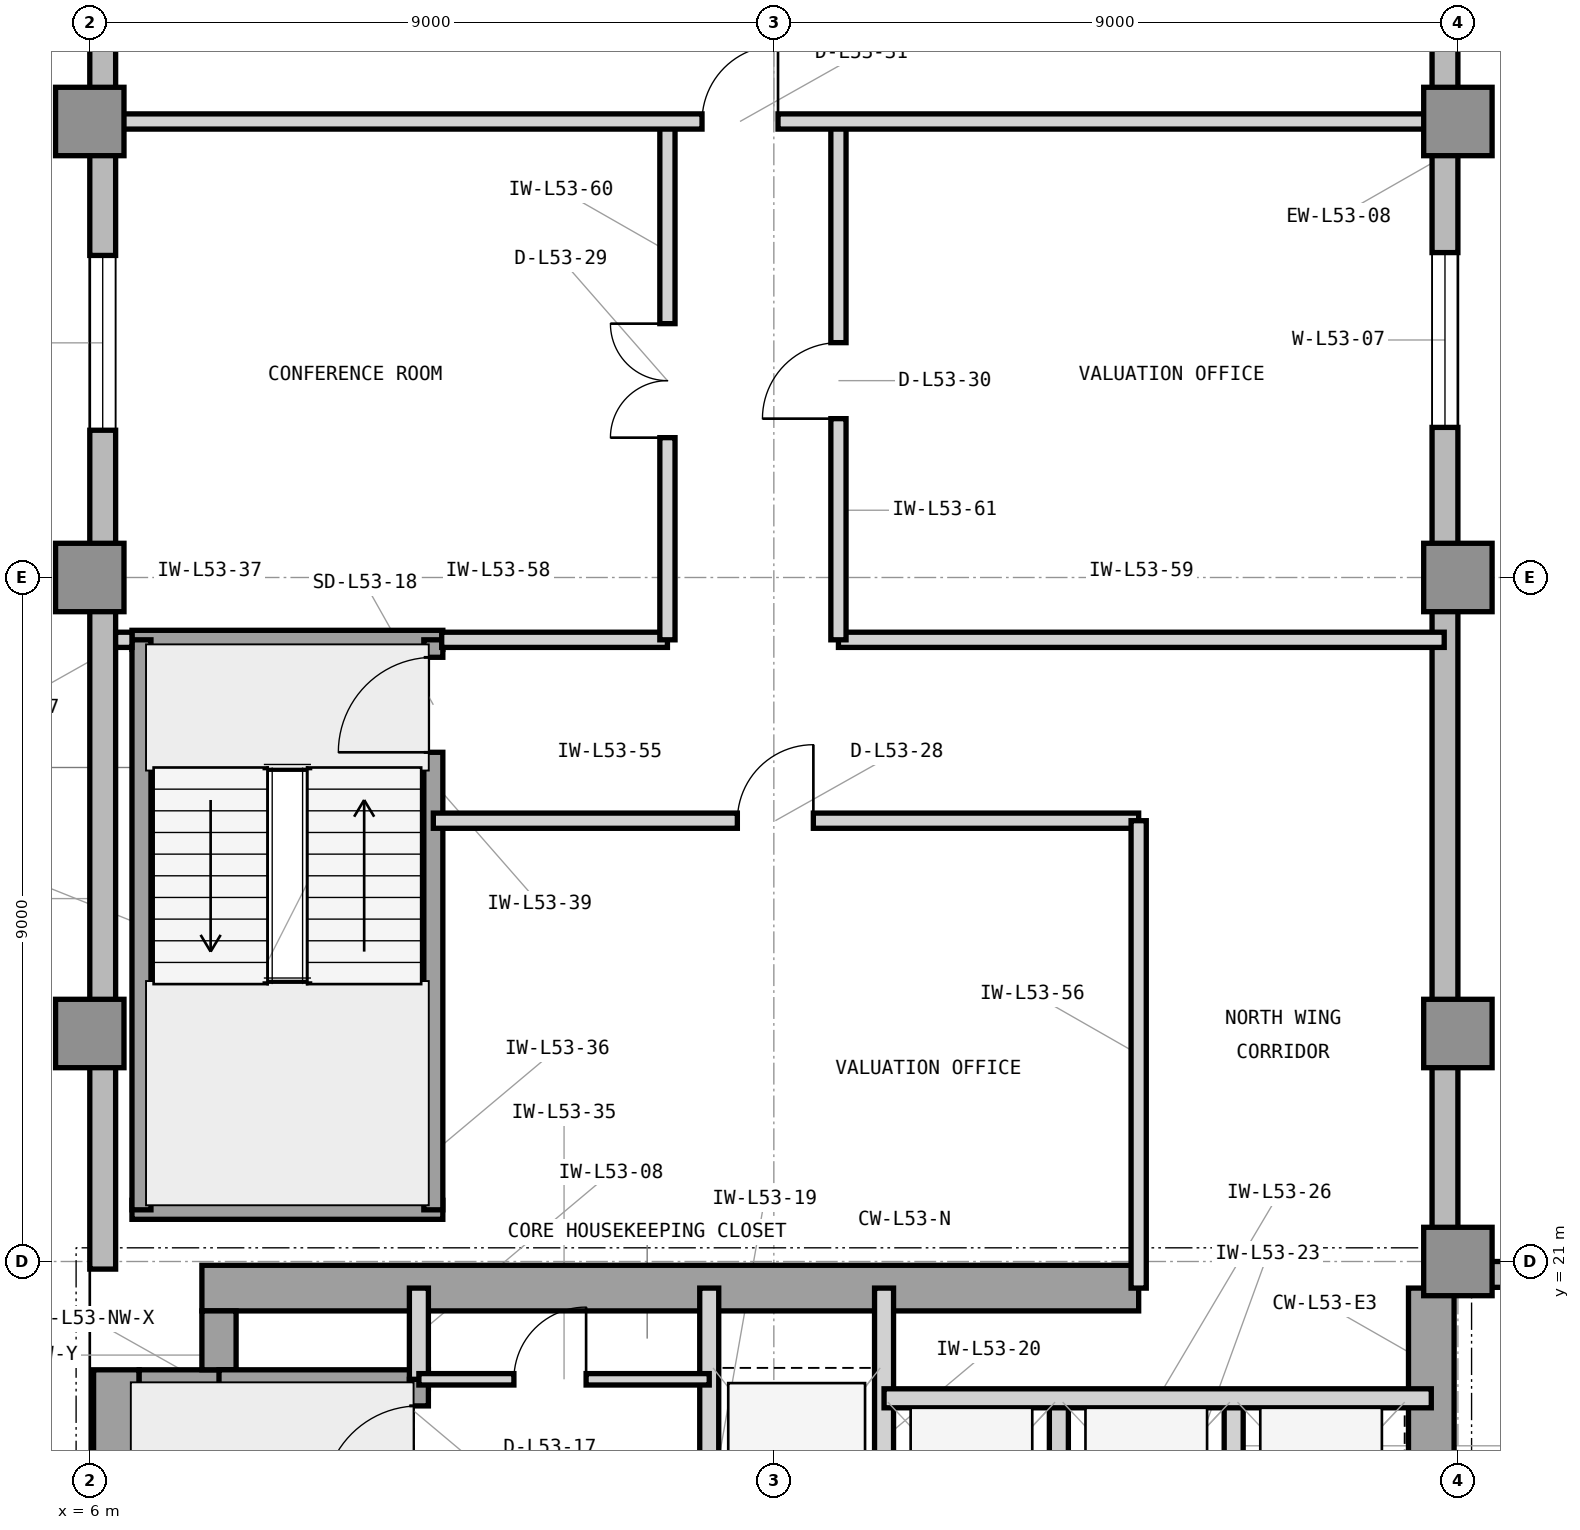
"""IFC4 building model, lengths in metres.
Left out: names, types, materials, properties, quantities, classifications, styles, units other than length and angle.
Written with IfcOpenShell. Run it as: python <this file> out.ifc"""

import sys

from ifc_helpers import new_model, si_unit, direction, frame, frame_2d, origin, origin_2d, place, context, subcontext, project, spatial, rectangle, extrude, element, fill, save


model = new_model("IFC4")
c1 = context("Model", 3, precision=1e-05, world=origin(), true_north=direction((0.0, 1.0)))
c2 = subcontext(c1, "Body", "Model", "MODEL_VIEW")
j1 = project(units=[si_unit("LENGTHUNIT", "METRE"), si_unit("PLANEANGLEUNIT", "RADIAN")], contexts=[c1])
p1 = place(None, origin())
s1 = spatial("IfcSite", under=j1, at=p1, CompositionType="ELEMENT")
p2 = place(p1, origin())
s2 = spatial("IfcBuilding", under=s1, at=p2, CompositionType="ELEMENT")
p3 = place(p2, frame((0.0, 0.0, 219.0)))
s3 = spatial("IfcBuildingStorey", under=s2, at=p3, CompositionType="ELEMENT", Elevation=219.0)
p4 = place(p3, frame((6.35, 4.425, 0.0), z_axis=(0.0, 0.0, 1.0), x_axis=(0.0, 1.0, 0.0)))
e1 = element("IfcWall", 1, at=p4, inside=s3, PredefinedType="SHEAR", context=c2, shape_type="SweptSolid", body=[
    extrude(rectangle(XDim=15.15, YDim=0.6, at=frame_2d((7.575, 0.0))), origin(), (0.0, 0.0, 1.0), 3.9),
])
p5 = place(p3, frame((7.475, 20.65, 0.0), z_axis=(0.0, 0.0, 1.0), x_axis=(1.0, 0.0, 0.0)))
e2 = element("IfcWall", 2, at=p5, inside=s3, PredefinedType="SHEAR", context=c2, shape_type="SweptSolid", body=[
    extrude(rectangle(XDim=12.325, YDim=0.6, at=frame_2d((6.163, 0.0))), origin(), (0.0, 0.0, 1.0), 3.9),
])
p6 = place(p3, frame((23.65, 16.6, 0.0), z_axis=(0.0, 0.0, 1.0), x_axis=(0.0, 1.0, 0.0)))
e3 = element("IfcWall", 3, at=p6, inside=s3, PredefinedType="SHEAR", context=c2, shape_type="SweptSolid", body=[
    extrude(rectangle(XDim=4.05, YDim=0.6, at=frame_2d((2.025, 0.0))), origin(), (0.0, 0.0, 1.0), 3.9),
])
p7 = place(p3, frame((6.65, 19.35, 0.0), z_axis=(0.0, 0.0, 1.0), x_axis=(1.0, 0.0, 0.0)))
e4 = element("IfcWall", 4, at=p7, inside=s3, PredefinedType="SHEAR", context=c2, shape_type="SweptSolid", body=[
    extrude(rectangle(XDim=1.275, YDim=0.45, at=frame_2d((0.638, 0.0))), origin(), (0.0, 0.0, 1.0), 3.9),
])
p8 = place(p3, frame((7.7, 19.575, 0.0), z_axis=(0.0, 0.0, 1.0), x_axis=(0.0, 1.0, 0.0)))
e5 = element("IfcWall", 5, at=p8, inside=s3, PredefinedType="SHEAR", context=c2, shape_type="SweptSolid", body=[
    extrude(rectangle(XDim=0.775, YDim=0.45, at=frame_2d((0.388, 0.0))), origin(), (0.0, 0.0, 1.0), 3.9),
])
for number, where, z_axis, x_axis in (
    (6, (24.0, 21.0, 0.0), (0.0, 0.0, 1.0), (1.0, 0.0, 0.0)),
    (7, (6.0, 24.0, 0.0), (0.0, 0.0, 1.0), (1.0, 0.0, 0.0)),
    (8, (24.0, 24.0, 0.0), (0.0, 0.0, 1.0), (1.0, 0.0, 0.0)),
    (9, (6.0, 30.0, 0.0), (0.0, 0.0, 1.0), (1.0, 0.0, 0.0)),
    (10, (24.0, 30.0, 0.0), (0.0, 0.0, 1.0), (1.0, 0.0, 0.0)),
    (11, (6.0, 36.0, 0.0), (0.0, 0.0, 1.0), (1.0, 0.0, 0.0)),
    (12, (24.0, 36.0, 0.0), (0.0, 0.0, 1.0), (1.0, 0.0, 0.0)),
):
    element("IfcColumn", number, at=place(p3, frame(where, z_axis=z_axis, x_axis=x_axis)), inside=s3, PredefinedType="COLUMN", context=c2, shape_type="SweptSolid", body=[
        extrude(rectangle(XDim=0.9, YDim=0.9, at=origin_2d()), origin(), (0.0, 0.0, 1.0), 3.9),
    ])
p9 = place(p3, frame((55.4, 20.83, 0.0), z_axis=(0.0, 0.0, 1.0), x_axis=(-1.0, 0.0, 0.0)))
e13 = element("IfcWall", 13, at=p9, inside=s3, PredefinedType="STANDARD", context=c2, shape_type="SweptSolid", body=[
    extrude(rectangle(XDim=31.4, YDim=0.34, at=frame_2d((15.7, 0.0))), origin(), (0.0, 0.0, 1.0), 3.65),
])
p10 = place(p9, frame((17.167, 0.0, 0.9)))
e14 = element("IfcOpeningElement", 14, at=p10, cuts=e13, PredefinedType="OPENING", context=c2, shape_type="SweptSolid", body=[
    extrude(rectangle(XDim=2.3, YDim=2.2, at=frame_2d((1.15, 1.1))), frame((0.0, 0.18, 0.0), z_axis=(0.0, -1.0, 0.0), x_axis=(1.0, 0.0, 0.0)), (0.0, 0.0, 1.0), 0.36),
])
p11 = place(p9, frame((29.046, 0.0, 0.9)))
e15 = element("IfcOpeningElement", 15, at=p11, cuts=e13, PredefinedType="OPENING", context=c2, shape_type="SweptSolid", body=[
    extrude(rectangle(XDim=1.6, YDim=2.2, at=frame_2d((0.8, 1.1))), frame((0.0, 0.18, 0.0), z_axis=(0.0, -1.0, 0.0), x_axis=(1.0, 0.0, 0.0)), (0.0, 0.0, 1.0), 0.36),
])
p12 = place(p9, frame((8.925, 0.0, 0.9)))
e16 = element("IfcOpeningElement", 16, at=p12, cuts=e13, PredefinedType="OPENING", context=c2, shape_type="SweptSolid", body=[
    extrude(rectangle(XDim=2.3, YDim=2.2, at=frame_2d((1.15, 1.1))), frame((0.0, 0.18, 0.0), z_axis=(0.0, -1.0, 0.0), x_axis=(1.0, 0.0, 0.0)), (0.0, 0.0, 1.0), 0.36),
])
p13 = place(p3, frame((23.83, 21.0, 0.0), z_axis=(0.0, 0.0, 1.0), x_axis=(0.0, 1.0, 0.0)))
e17 = element("IfcWall", 17, at=p13, inside=s3, PredefinedType="STANDARD", context=c2, shape_type="SweptSolid", body=[
    extrude(rectangle(XDim=19.4, YDim=0.34, at=frame_2d((9.7, 0.0))), origin(), (0.0, 0.0, 1.0), 3.65),
])
p14 = place(p13, frame((10.975, 0.0, 0.9)))
e18 = element("IfcOpeningElement", 18, at=p14, cuts=e17, PredefinedType="OPENING", context=c2, shape_type="SweptSolid", body=[
    extrude(rectangle(XDim=2.3, YDim=2.2, at=frame_2d((1.15, 1.1))), frame((0.0, 0.18, 0.0), z_axis=(0.0, -1.0, 0.0), x_axis=(1.0, 0.0, 0.0)), (0.0, 0.0, 1.0), 0.36),
])
p15 = place(p3, frame((6.17, 40.4, 0.0), z_axis=(0.0, 0.0, 1.0), x_axis=(0.0, -1.0, 0.0)))
e19 = element("IfcWall", 19, at=p15, inside=s3, PredefinedType="STANDARD", context=c2, shape_type="SweptSolid", body=[
    extrude(rectangle(XDim=19.5, YDim=0.34, at=frame_2d((9.75, 0.0))), origin(), (0.0, 0.0, 1.0), 3.65),
])
p16 = place(p15, frame((6.163, 0.0, 0.9)))
e20 = element("IfcOpeningElement", 20, at=p16, cuts=e19, PredefinedType="OPENING", context=c2, shape_type="SweptSolid", body=[
    extrude(rectangle(XDim=2.3, YDim=2.2, at=frame_2d((1.15, 1.1))), frame((0.0, 0.18, 0.0), z_axis=(0.0, -1.0, 0.0), x_axis=(1.0, 0.0, 0.0)), (0.0, 0.0, 1.0), 0.36),
])
p17 = place(p3, frame((7.7, 19.45, 0.0), z_axis=(0.0, 0.0, 1.0), x_axis=(1.0, 0.0, 0.0)))
e21 = element("IfcWall", 21, at=p17, inside=s3, PredefinedType="SHEAR", context=c2, shape_type="SweptSolid", body=[
    extrude(rectangle(XDim=2.755, YDim=0.25, at=frame_2d((1.377, 0.0))), origin(), (0.0, 0.0, 1.0), 3.9),
])
p18 = place(p3, frame((10.33, 12.0, 0.0), z_axis=(0.0, 0.0, 1.0), x_axis=(0.0, 1.0, 0.0)))
e22 = element("IfcWall", 22, at=p18, inside=s3, PredefinedType="SHEAR", context=c2, shape_type="SweptSolid", body=[
    extrude(rectangle(XDim=7.45, YDim=0.25, at=frame_2d((3.725, 0.0))), origin(), (0.0, 0.0, 1.0), 3.9),
])
p19 = place(p18, frame((5.85, 0.0, 0.0)))
e23 = element("IfcOpeningElement", 23, at=p19, cuts=e22, PredefinedType="OPENING", context=c2, shape_type="SweptSolid", body=[
    extrude(rectangle(XDim=1.25, YDim=2.2, at=frame_2d((0.625, 1.1))), frame((0.0, 0.135, 0.0), z_axis=(0.0, -1.0, 0.0), x_axis=(1.0, 0.0, 0.0)), (0.0, 0.0, 1.0), 0.27),
])
p20 = place(p3, frame((10.33, 19.45, 0.0), z_axis=(0.0, 0.0, 1.0), x_axis=(0.0, 1.0, 0.0)))
e24 = element("IfcWall", 24, at=p20, inside=s3, PredefinedType="PARTITIONING", context=c2, shape_type="SweptSolid", body=[
    extrude(rectangle(XDim=1.2, YDim=0.25, at=frame_2d((0.6, 0.0))), origin(), (0.0, 0.0, 1.0), 3.64),
])
for number, where, z_axis, x_axis in (
    (25, (14.15, 16.7, 0.0), (0.0, 0.0, 1.0), (0.0, 1.0, 0.0)),
    (26, (16.45, 16.7, 0.0), (0.0, 0.0, 1.0), (0.0, 1.0, 0.0)),
):
    element("IfcWall", number, at=place(p3, frame(where, z_axis=z_axis, x_axis=x_axis)), inside=s3, PredefinedType="PARTITIONING", context=c2, shape_type="SweptSolid", body=[
        extrude(rectangle(XDim=3.95, YDim=0.25, at=frame_2d((1.975, 0.0))), origin(), (0.0, 0.0, 1.0), 3.64),
    ])
for number, where, z_axis, x_axis in (
    (27, (18.75, 16.7, 0.0), (0.0, 0.0, 1.0), (0.0, 1.0, 0.0)),
    (28, (21.05, 16.7, 0.0), (0.0, 0.0, 1.0), (0.0, 1.0, 0.0)),
):
    element("IfcWall", number, at=place(p3, frame(where, z_axis=z_axis, x_axis=x_axis)), inside=s3, PredefinedType="PARTITIONING", context=c2, shape_type="SweptSolid", body=[
        extrude(rectangle(XDim=2.5, YDim=0.25, at=frame_2d((1.25, 0.0))), origin(), (0.0, 0.0, 1.0), 3.64),
    ])
p21 = place(p3, frame((16.45, 19.2, 0.0), z_axis=(0.0, 0.0, 1.0), x_axis=(1.0, 0.0, 0.0)))
e29 = element("IfcWall", 29, at=p21, inside=s3, PredefinedType="PARTITIONING", context=c2, shape_type="SweptSolid", body=[
    extrude(rectangle(XDim=7.2, YDim=0.25, at=frame_2d((3.6, 0.0))), origin(), (0.0, 0.0, 1.0), 3.64),
])
p22 = place(p3, frame((10.33, 19.45, 0.0), z_axis=(0.0, 0.0, 1.0), x_axis=(1.0, 0.0, 0.0)))
e30 = element("IfcWall", 30, at=p22, inside=s3, PredefinedType="PARTITIONING", context=c2, shape_type="SweptSolid", body=[
    extrude(rectangle(XDim=3.82, YDim=0.15, at=frame_2d((1.91, 0.0))), origin(), (0.0, 0.0, 1.0), 3.64),
])
p23 = place(p22, frame((1.25, 0.0, 0.0)))
e31 = element("IfcOpeningElement", 31, at=p23, cuts=e30, PredefinedType="OPENING", context=c2, shape_type="SweptSolid", body=[
    extrude(rectangle(XDim=0.95, YDim=2.1, at=frame_2d((0.475, 1.05))), frame((0.0, 0.085, 0.0), z_axis=(0.0, -1.0, 0.0), x_axis=(1.0, 0.0, 0.0)), (0.0, 0.0, 1.0), 0.17),
])
for number, where, z_axis, x_axis in (
    (32, (6.555, 21.68, 0.0), (0.0, 0.0, 1.0), (1.0, 0.0, 0.0)),
    (33, (6.555, 29.18, 0.0), (0.0, 0.0, 1.0), (1.0, 0.0, 0.0)),
):
    element("IfcWall", number, at=place(p3, frame(where, z_axis=z_axis, x_axis=x_axis)), inside=s3, PredefinedType="SHEAR", context=c2, shape_type="SweptSolid", body=[
        extrude(rectangle(XDim=4.09, YDim=0.25, at=frame_2d((2.045, 0.0))), origin(), (0.0, 0.0, 1.0), 3.9),
    ])
p24 = place(p3, frame((6.68, 21.68, 0.0), z_axis=(0.0, 0.0, 1.0), x_axis=(0.0, 1.0, 0.0)))
e34 = element("IfcWall", 34, at=p24, inside=s3, PredefinedType="SHEAR", context=c2, shape_type="SweptSolid", body=[
    extrude(rectangle(XDim=7.5, YDim=0.25, at=frame_2d((3.75, 0.0))), origin(), (0.0, 0.0, 1.0), 3.9),
])
p25 = place(p3, frame((10.52, 21.68, 0.0), z_axis=(0.0, 0.0, 1.0), x_axis=(0.0, 1.0, 0.0)))
e35 = element("IfcWall", 35, at=p25, inside=s3, PredefinedType="SHEAR", context=c2, shape_type="SweptSolid", body=[
    extrude(rectangle(XDim=7.5, YDim=0.25, at=frame_2d((3.75, 0.0))), origin(), (0.0, 0.0, 1.0), 3.9),
])
p26 = place(p25, frame((6.02, 0.0, 0.0)))
e36 = element("IfcOpeningElement", 36, at=p26, cuts=e35, PredefinedType="OPENING", context=c2, shape_type="SweptSolid", body=[
    extrude(rectangle(XDim=1.25, YDim=2.2, at=frame_2d((0.625, 1.1))), frame((0.0, 0.135, 0.0), z_axis=(0.0, -1.0, 0.0), x_axis=(1.0, 0.0, 0.0)), (0.0, 0.0, 1.0), 0.27),
])
p27 = place(p3, frame((10.52, 26.8, 0.0), z_axis=(0.0, 0.0, 1.0), x_axis=(1.0, 0.0, 0.0)))
e37 = element("IfcWall", 37, at=p27, inside=s3, PredefinedType="PARTITIONING", context=c2, shape_type="SweptSolid", body=[
    extrude(rectangle(XDim=9.28, YDim=0.2, at=frame_2d((4.64, 0.0))), origin(), (0.0, 0.0, 1.0), 3.64),
])
p28 = place(p27, frame((4.0, 0.0, 0.0)))
e38 = element("IfcOpeningElement", 38, at=p28, cuts=e37, PredefinedType="OPENING", context=c2, shape_type="SweptSolid", body=[
    extrude(rectangle(XDim=1.0, YDim=2.15, at=frame_2d((0.5, 1.075))), frame((0.0, 0.11, 0.0), z_axis=(0.0, -1.0, 0.0), x_axis=(1.0, 0.0, 0.0)), (0.0, 0.0, 1.0), 0.22),
])
p29 = place(p3, frame((19.8, 20.65, 0.0), z_axis=(0.0, 0.0, 1.0), x_axis=(0.0, 1.0, 0.0)))
e39 = element("IfcWall", 39, at=p29, inside=s3, PredefinedType="PARTITIONING", context=c2, shape_type="SweptSolid", body=[
    extrude(rectangle(XDim=6.15, YDim=0.2, at=frame_2d((3.075, 0.0))), origin(), (0.0, 0.0, 1.0), 3.64),
])
p30 = place(p3, frame((6.34, 29.18, 0.0), z_axis=(0.0, 0.0, 1.0), x_axis=(1.0, 0.0, 0.0)))
e40 = element("IfcWall", 40, at=p30, inside=s3, PredefinedType="PARTITIONING", context=c2, shape_type="SweptSolid", body=[
    extrude(rectangle(XDim=0.215, YDim=0.2, at=frame_2d((0.107, 0.0))), origin(), (0.0, 0.0, 1.0), 3.64),
])
p31 = place(p3, frame((10.63, 29.18, 0.0), z_axis=(0.0, 0.0, 1.0), x_axis=(1.0, 0.0, 0.0)))
e41 = element("IfcWall", 41, at=p31, inside=s3, PredefinedType="PARTITIONING", context=c2, shape_type="SweptSolid", body=[
    extrude(rectangle(XDim=2.97, YDim=0.2, at=frame_2d((1.485, 0.0))), origin(), (0.0, 0.0, 1.0), 3.64),
])
p32 = place(p3, frame((15.85, 29.18, 0.0), z_axis=(0.0, 0.0, 1.0), x_axis=(1.0, 0.0, 0.0)))
e42 = element("IfcWall", 42, at=p32, inside=s3, PredefinedType="PARTITIONING", context=c2, shape_type="SweptSolid", body=[
    extrude(rectangle(XDim=7.97, YDim=0.2, at=frame_2d((3.985, 0.0))), origin(), (0.0, 0.0, 1.0), 3.64),
])
p33 = place(p3, frame((13.6, 29.18, 0.0), z_axis=(0.0, 0.0, 1.0), x_axis=(0.0, 1.0, 0.0)))
e43 = element("IfcWall", 43, at=p33, inside=s3, PredefinedType="PARTITIONING", context=c2, shape_type="SweptSolid", body=[
    extrude(rectangle(XDim=6.82, YDim=0.2, at=frame_2d((3.41, 0.0))), origin(), (0.0, 0.0, 1.0), 3.64),
])
p34 = place(p33, frame((2.66, 0.0, 0.0)))
e44 = element("IfcOpeningElement", 44, at=p34, cuts=e43, PredefinedType="OPENING", context=c2, shape_type="SweptSolid", body=[
    extrude(rectangle(XDim=1.5, YDim=2.3, at=frame_2d((0.75, 1.15))), frame((0.0, 0.11, 0.0), z_axis=(0.0, -1.0, 0.0), x_axis=(1.0, 0.0, 0.0)), (0.0, 0.0, 1.0), 0.22),
])
p35 = place(p3, frame((15.85, 29.18, 0.0), z_axis=(0.0, 0.0, 1.0), x_axis=(0.0, 1.0, 0.0)))
e45 = element("IfcWall", 45, at=p35, inside=s3, PredefinedType="PARTITIONING", context=c2, shape_type="SweptSolid", body=[
    extrude(rectangle(XDim=6.82, YDim=0.2, at=frame_2d((3.41, 0.0))), origin(), (0.0, 0.0, 1.0), 3.64),
])
p36 = place(p35, frame((2.91, 0.0, 0.0)))
e46 = element("IfcOpeningElement", 46, at=p36, cuts=e45, PredefinedType="OPENING", context=c2, shape_type="SweptSolid", body=[
    extrude(rectangle(XDim=1.0, YDim=2.15, at=frame_2d((0.5, 1.075))), frame((0.0, 0.11, 0.0), z_axis=(0.0, -1.0, 0.0), x_axis=(1.0, 0.0, 0.0)), (0.0, 0.0, 1.0), 0.22),
])
p37 = place(p3, frame((6.18, 36.0, 0.0), z_axis=(0.0, 0.0, 1.0), x_axis=(1.0, 0.0, 0.0)))
e47 = element("IfcWall", 47, at=p37, inside=s3, PredefinedType="PARTITIONING", context=c2, shape_type="SweptSolid", body=[
    extrude(rectangle(XDim=17.64, YDim=0.2, at=frame_2d((8.82, 0.0))), origin(), (0.0, 0.0, 1.0), 3.073),
])
p38 = place(p37, frame((7.875, 0.0, 0.0)))
e48 = element("IfcOpeningElement", 48, at=p38, cuts=e47, PredefinedType="OPENING", context=c2, shape_type="SweptSolid", body=[
    extrude(rectangle(XDim=1.0, YDim=2.15, at=frame_2d((0.5, 1.075))), frame((0.0, 0.11, 0.0), z_axis=(0.0, -1.0, 0.0), x_axis=(1.0, 0.0, 0.0)), (0.0, 0.0, 1.0), 0.22),
])
p39 = place(p14, origin())
e49 = element("IfcWindow", 49, at=p39, inside=s3, PartitioningType="SINGLE_PANEL", PredefinedType="WINDOW", context=c2, shape_type="SweptSolid", body=[
    extrude(rectangle(XDim=2.3, YDim=2.2, at=frame_2d((1.15, 1.1))), frame((0.0, 0.11, 0.0), z_axis=(0.0, -1.0, 0.0), x_axis=(1.0, 0.0, 0.0)), (0.0, 0.0, 1.0), 0.06),
])
fill(e18, e49)
p40 = place(p16, origin())
e50 = element("IfcWindow", 50, at=p40, inside=s3, PartitioningType="SINGLE_PANEL", PredefinedType="WINDOW", context=c2, shape_type="SweptSolid", body=[
    extrude(rectangle(XDim=2.3, YDim=2.2, at=frame_2d((1.15, 1.1))), frame((0.0, 0.11, 0.0), z_axis=(0.0, -1.0, 0.0), x_axis=(1.0, 0.0, 0.0)), (0.0, 0.0, 1.0), 0.06),
])
fill(e20, e50)
p41 = place(p19, origin())
e51 = element("IfcDoor", 51, at=p41, inside=s3, OperationType="SINGLE_SWING_LEFT", PredefinedType="DOOR", context=c2, shape_type="SweptSolid", body=[
    extrude(rectangle(XDim=1.25, YDim=2.2, at=frame_2d((0.625, 1.1))), frame((0.0, 0.025, 0.0), z_axis=(0.0, -1.0, 0.0), x_axis=(1.0, 0.0, 0.0)), (0.0, 0.0, 1.0), 0.05),
])
fill(e23, e51)
p42 = place(p23, origin())
e52 = element("IfcDoor", 52, at=p42, inside=s3, OperationType="SINGLE_SWING_RIGHT", PredefinedType="DOOR", context=c2, shape_type="SweptSolid", body=[
    extrude(rectangle(XDim=0.95, YDim=2.1, at=frame_2d((0.475, 1.05))), frame((0.0, 0.025, 0.0), z_axis=(0.0, -1.0, 0.0), x_axis=(1.0, 0.0, 0.0)), (0.0, 0.0, 1.0), 0.05),
])
fill(e31, e52)
p43 = place(p26, origin())
e53 = element("IfcDoor", 53, at=p43, inside=s3, OperationType="SINGLE_SWING_LEFT", PredefinedType="DOOR", context=c2, shape_type="SweptSolid", body=[
    extrude(rectangle(XDim=1.25, YDim=2.2, at=frame_2d((0.625, 1.1))), frame((0.0, 0.025, 0.0), z_axis=(0.0, -1.0, 0.0), x_axis=(1.0, 0.0, 0.0)), (0.0, 0.0, 1.0), 0.05),
])
fill(e36, e53)
p44 = place(p28, origin())
e54 = element("IfcDoor", 54, at=p44, inside=s3, OperationType="SINGLE_SWING_RIGHT", PredefinedType="DOOR", context=c2, shape_type="SweptSolid", body=[
    extrude(rectangle(XDim=1.0, YDim=2.15, at=frame_2d((0.5, 1.075))), frame((0.0, 0.025, 0.0), z_axis=(0.0, -1.0, 0.0), x_axis=(1.0, 0.0, 0.0)), (0.0, 0.0, 1.0), 0.05),
])
fill(e38, e54)
p45 = place(p34, origin())
e55 = element("IfcDoor", 55, at=p45, inside=s3, OperationType="DOUBLE_DOOR_SINGLE_SWING", PredefinedType="DOOR", context=c2, shape_type="SweptSolid", body=[
    extrude(rectangle(XDim=1.5, YDim=2.3, at=frame_2d((0.75, 1.15))), frame((0.0, 0.025, 0.0), z_axis=(0.0, -1.0, 0.0), x_axis=(1.0, 0.0, 0.0)), (0.0, 0.0, 1.0), 0.05),
])
fill(e44, e55)
p46 = place(p36, origin())
e56 = element("IfcDoor", 56, at=p46, inside=s3, OperationType="SINGLE_SWING_LEFT", PredefinedType="DOOR", context=c2, shape_type="SweptSolid", body=[
    extrude(rectangle(XDim=1.0, YDim=2.15, at=frame_2d((0.5, 1.075))), frame((0.0, 0.025, 0.0), z_axis=(0.0, -1.0, 0.0), x_axis=(1.0, 0.0, 0.0)), (0.0, 0.0, 1.0), 0.05),
])
fill(e46, e56)
p47 = place(p38, origin())
e57 = element("IfcDoor", 57, at=p47, inside=s3, OperationType="SINGLE_SWING_RIGHT", PredefinedType="DOOR", context=c2, shape_type="SweptSolid", body=[
    extrude(rectangle(XDim=1.0, YDim=2.15, at=frame_2d((0.5, 1.075))), frame((0.0, 0.025, 0.0), z_axis=(0.0, -1.0, 0.0), x_axis=(1.0, 0.0, 0.0)), (0.0, 0.0, 1.0), 0.05),
])
fill(e48, e57)
save(model, sys.argv[1])
